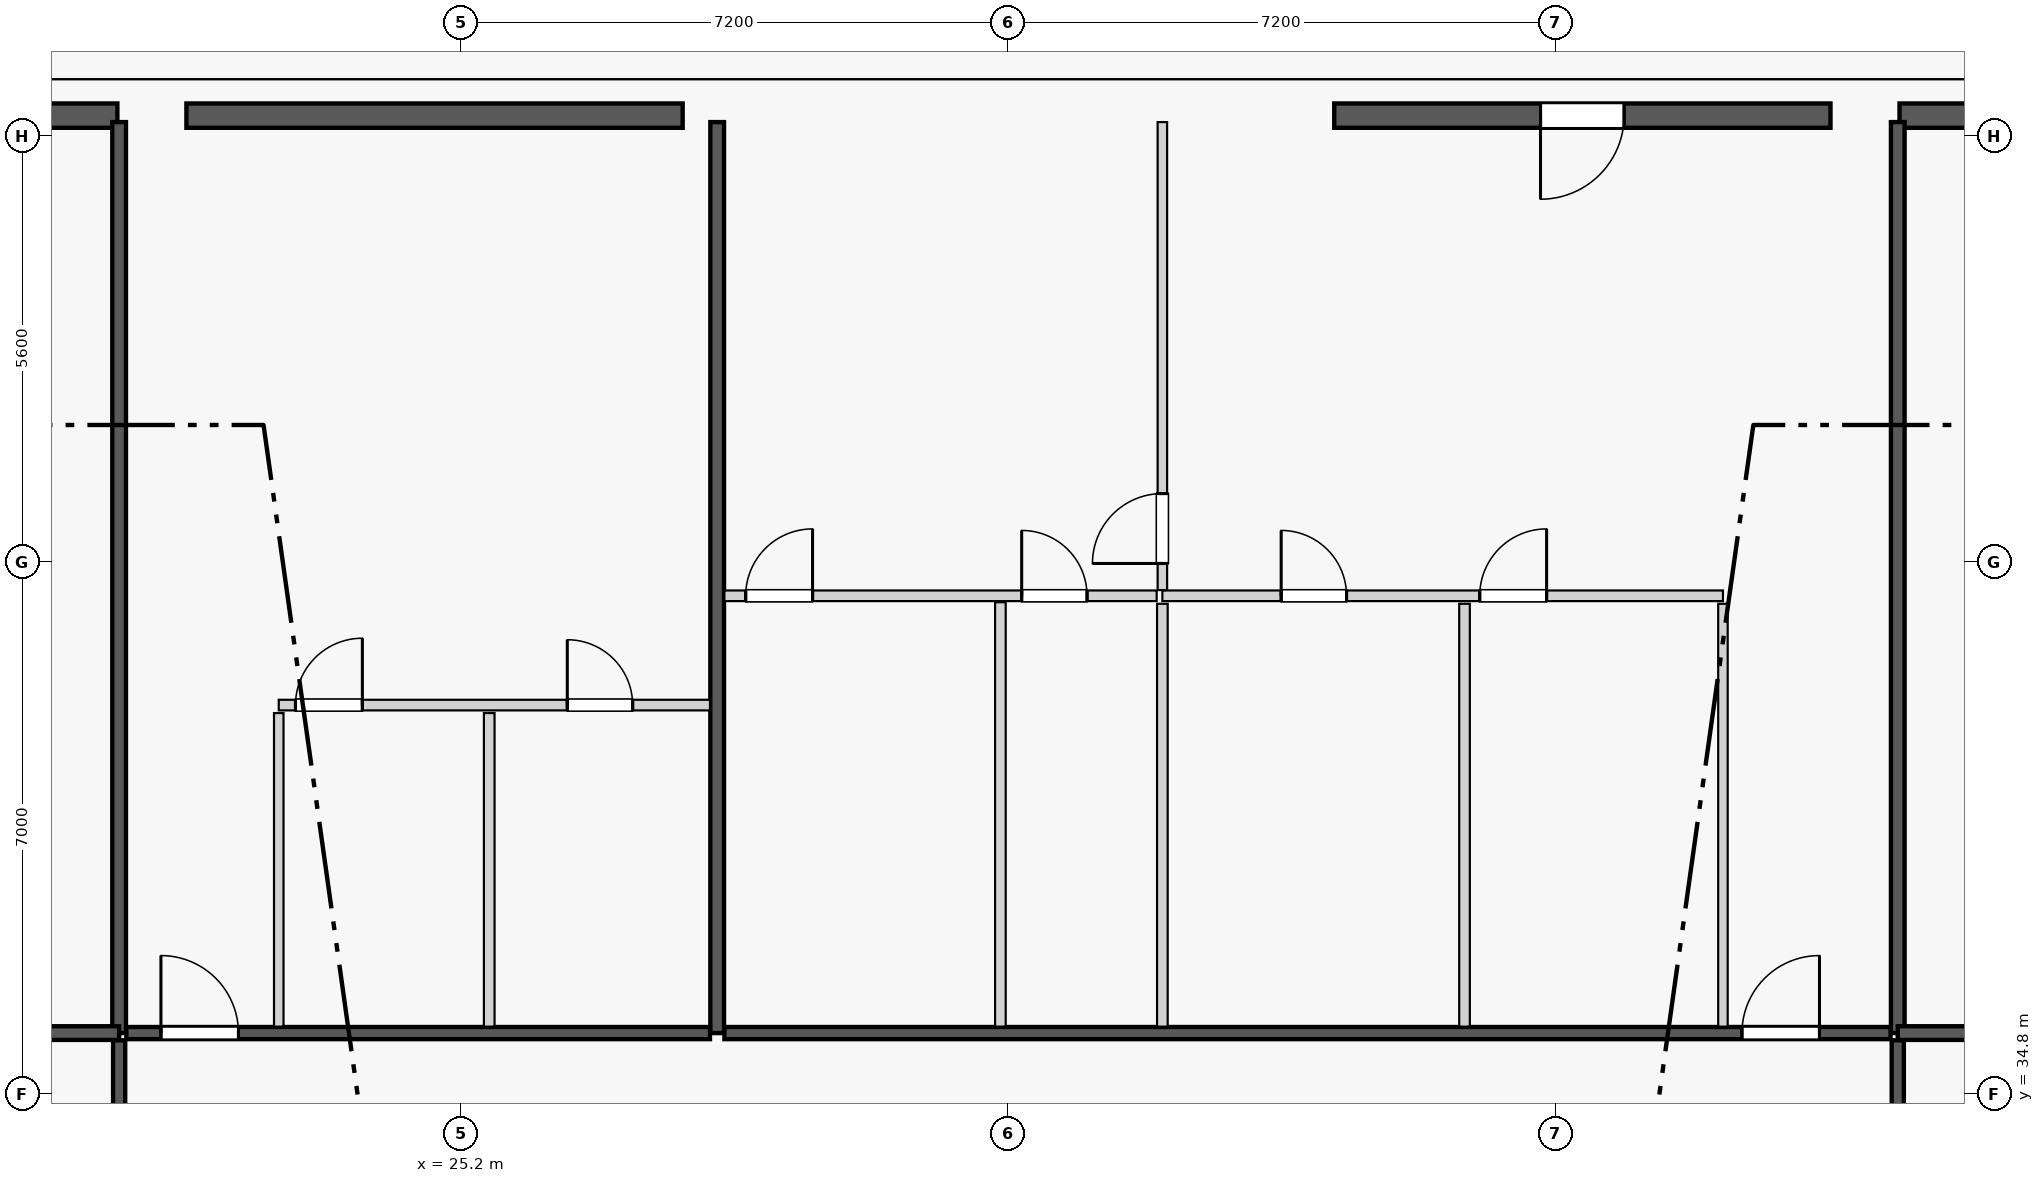
"""IFC4 building model, lengths in metres.
Left out: names, types, materials, properties, quantities, classifications, styles, units other than length and angle.
Written with IfcOpenShell. Run it as: python <this file> out.ifc"""

import sys

from ifc_helpers import new_model, si_unit, direction, frame, frame_2d, origin, origin_2d, place, context, subcontext, project, spatial, rectangle, extrude, element, fill, save


model = new_model("IFC4")
c1 = context("Model", 3, precision=1e-05, world=origin(), true_north=direction((0.0, 1.0)))
c2 = subcontext(c1, "Body", "Model", "MODEL_VIEW")
j1 = project(units=[si_unit("LENGTHUNIT", "METRE"), si_unit("PLANEANGLEUNIT", "RADIAN")], contexts=[c1])
p1 = place(None, origin())
s1 = spatial("IfcSite", under=j1, at=p1, CompositionType="ELEMENT")
p2 = place(p1, origin())
s2 = spatial("IfcBuilding", under=s1, at=p2, CompositionType="ELEMENT")
p3 = place(p2, frame((0.0, 0.0, 167.7)))
s3 = spatial("IfcBuildingStorey", under=s2, at=p3, CompositionType="ELEMENT", Elevation=167.7)
for number, where, z_axis, x_axis in (
    (1, (43.669, 47.661, 0.0), (0.0, 0.0, 1.0), (1.0, 0.0, 0.0)),
    (2, (36.232, 47.608, 0.0), (0.0, 0.0, 1.0), (1.0, 0.0, 0.0)),
    (3, (28.568, 47.608, 0.0), (0.0, 0.0, 1.0), (1.0, 0.0, 0.0)),
    (4, (21.131, 47.661, 0.0), (0.0, 0.0, 1.0), (1.0, 0.0, 0.0)),
):
    element("IfcColumn", number, at=place(p3, frame(where, z_axis=z_axis, x_axis=x_axis)), inside=s3, PredefinedType="COLUMN", context=c2, shape_type="SweptSolid", body=[
        extrude(rectangle(XDim=0.9, YDim=0.9, at=origin_2d()), origin(), (0.0, 0.0, 1.0), 4.2),
    ])
p4 = place(p3, frame((45.4, 47.67, 0.0), z_axis=(0.0, 0.0, 1.0), x_axis=(-1.0, 0.0, 0.0)))
e5 = element("IfcWall", 5, at=p4, inside=s3, PredefinedType="STANDARD", context=c2, shape_type="SweptSolid", body=[
    extrude(rectangle(XDim=1.277, YDim=0.32, at=frame_2d((0.638, 0.0))), origin(), (0.0, 0.0, 1.0), 4.0),
])
p5 = place(p3, frame((43.215, 47.67, 0.0), z_axis=(0.0, 0.0, 1.0), x_axis=(-1.0, 0.0, 0.0)))
e6 = element("IfcWall", 6, at=p5, inside=s3, PredefinedType="STANDARD", context=c2, shape_type="SweptSolid", body=[
    extrude(rectangle(XDim=6.529, YDim=0.32, at=frame_2d((3.265, 0.0))), origin(), (0.0, 0.0, 1.0), 2.59),
])
p6 = place(p5, frame((2.715, 0.0, 0.0)))
e7 = element("IfcOpeningElement", 7, at=p6, cuts=e6, PredefinedType="OPENING", context=c2, shape_type="SweptSolid", body=[
    extrude(rectangle(XDim=1.1, YDim=2.25, at=frame_2d((0.55, 1.125))), frame((0.0, 0.17, 0.0), z_axis=(0.0, -1.0, 0.0), x_axis=(1.0, 0.0, 0.0)), (0.0, 0.0, 1.0), 0.34),
])
p7 = place(p3, frame((28.114, 47.67, 0.0), z_axis=(0.0, 0.0, 1.0), x_axis=(-1.0, 0.0, 0.0)))
e8 = element("IfcWall", 8, at=p7, inside=s3, PredefinedType="STANDARD", context=c2, shape_type="SweptSolid", body=[
    extrude(rectangle(XDim=6.529, YDim=0.32, at=frame_2d((3.265, 0.0))), origin(), (0.0, 0.0, 1.0), 2.59),
])
p8 = place(p7, frame((2.715, 0.0, 0.75)))
e9 = element("IfcOpeningElement", 9, at=p8, cuts=e8, PredefinedType="OPENING", context=c2, shape_type="SweptSolid", body=[
    extrude(rectangle(XDim=1.1, YDim=1.69, at=frame_2d((0.55, 0.845))), frame((0.0, 0.17, 0.0), z_axis=(0.0, -1.0, 0.0), x_axis=(1.0, 0.0, 0.0)), (0.0, 0.0, 1.0), 0.34),
])
p9 = place(p3, frame((20.677, 47.67, 0.0), z_axis=(0.0, 0.0, 1.0), x_axis=(-1.0, 0.0, 0.0)))
e10 = element("IfcWall", 10, at=p9, inside=s3, PredefinedType="STANDARD", context=c2, shape_type="SweptSolid", body=[
    extrude(rectangle(XDim=1.277, YDim=0.32, at=frame_2d((0.639, 0.0))), origin(), (0.0, 0.0, 1.0), 4.0),
])
p10 = place(p3, frame((20.7, 35.6, 0.0), z_axis=(0.0, 0.0, 1.0), x_axis=(0.0, 1.0, 0.0)))
e11 = element("IfcWall", 11, at=p10, inside=s3, PredefinedType="PARTITIONING", context=c2, shape_type="SweptSolid", body=[
    extrude(rectangle(XDim=11.985, YDim=0.18, at=frame_2d((5.992, 0.0))), origin(), (0.0, 0.0, 1.0), 4.0),
])
p11 = place(p3, frame((28.568, 35.6, 0.0), z_axis=(0.0, 0.0, 1.0), x_axis=(0.0, 1.0, 0.0)))
e12 = element("IfcWall", 12, at=p11, inside=s3, PredefinedType="PARTITIONING", context=c2, shape_type="SweptSolid", body=[
    extrude(rectangle(XDim=11.985, YDim=0.18, at=frame_2d((5.992, 0.0))), origin(), (0.0, 0.0, 1.0), 2.59),
])
p12 = place(p3, frame((44.1, 35.6, 0.0), z_axis=(0.0, 0.0, 1.0), x_axis=(0.0, 1.0, 0.0)))
e13 = element("IfcWall", 13, at=p12, inside=s3, PredefinedType="PARTITIONING", context=c2, shape_type="SweptSolid", body=[
    extrude(rectangle(XDim=11.985, YDim=0.18, at=frame_2d((5.992, 0.0))), origin(), (0.0, 0.0, 1.0), 4.0),
])
p13 = place(p3, frame((20.795, 35.6, 0.0), z_axis=(0.0, 0.0, 1.0), x_axis=(1.0, 0.0, 0.0)))
e14 = element("IfcWall", 14, at=p13, inside=s3, PredefinedType="PARTITIONING", context=c2, shape_type="SweptSolid", body=[
    extrude(rectangle(XDim=7.678, YDim=0.16, at=frame_2d((3.839, 0.0))), origin(), (0.0, 0.0, 1.0), 4.0),
])
p14 = place(p13, frame((0.455, 0.0, 0.0)))
e15 = element("IfcOpeningElement", 15, at=p14, cuts=e14, PredefinedType="OPENING", context=c2, shape_type="SweptSolid", body=[
    extrude(rectangle(XDim=1.02, YDim=2.25, at=frame_2d((0.51, 1.125))), frame((0.0, 0.09, 0.0), z_axis=(0.0, -1.0, 0.0), x_axis=(1.0, 0.0, 0.0)), (0.0, 0.0, 1.0), 0.18),
])
p15 = place(p3, frame((22.8, 35.685, 0.0), z_axis=(0.0, 0.0, 1.0), x_axis=(0.0, 1.0, 0.0)))
e16 = element("IfcWall", 16, at=p15, inside=s3, PredefinedType="PARTITIONING", context=c2, shape_type="SweptSolid", body=[
    extrude(rectangle(XDim=4.125, YDim=0.125, at=frame_2d((2.062, 0.0))), origin(), (0.0, 0.0, 1.0), 2.59),
])
p16 = place(p3, frame((22.8, 39.915, 0.0), z_axis=(0.0, 0.0, 1.0), x_axis=(1.0, 0.0, 0.0)))
e17 = element("IfcWall", 17, at=p16, inside=s3, PredefinedType="PLUMBINGWALL", context=c2, shape_type="SweptSolid", body=[
    extrude(rectangle(XDim=5.673, YDim=0.14, at=frame_2d((2.836, 0.0))), origin(), (0.0, 0.0, 1.0), 4.0),
])
p17 = place(p16, frame((3.796, 0.0, 0.0)))
e18 = element("IfcOpeningElement", 18, at=p17, cuts=e17, PredefinedType="OPENING", context=c2, shape_type="SweptSolid", body=[
    extrude(rectangle(XDim=0.86, YDim=2.1, at=frame_2d((0.43, 1.05))), frame((0.0, 0.08, 0.0), z_axis=(0.0, -1.0, 0.0), x_axis=(1.0, 0.0, 0.0)), (0.0, 0.0, 1.0), 0.16),
])
p18 = place(p16, frame((0.22, 0.0, 0.0)))
e19 = element("IfcOpeningElement", 19, at=p18, cuts=e17, PredefinedType="OPENING", context=c2, shape_type="SweptSolid", body=[
    extrude(rectangle(XDim=0.88, YDim=2.15, at=frame_2d((0.44, 1.075))), frame((0.0, 0.08, 0.0), z_axis=(0.0, -1.0, 0.0), x_axis=(1.0, 0.0, 0.0)), (0.0, 0.0, 1.0), 0.16),
])
p19 = place(p3, frame((25.569, 35.685, 0.0), z_axis=(0.0, 0.0, 1.0), x_axis=(0.0, 1.0, 0.0)))
e20 = element("IfcWall", 20, at=p19, inside=s3, PredefinedType="PLUMBINGWALL", context=c2, shape_type="SweptSolid", body=[
    extrude(rectangle(XDim=4.125, YDim=0.14, at=frame_2d((2.062, 0.0))), origin(), (0.0, 0.0, 1.0), 4.0),
])
p20 = place(p3, frame((28.663, 35.6, 0.0), z_axis=(0.0, 0.0, 1.0), x_axis=(1.0, 0.0, 0.0)))
e21 = element("IfcWall", 21, at=p20, inside=s3, PredefinedType="PARTITIONING", context=c2, shape_type="SweptSolid", body=[
    extrude(rectangle(XDim=15.342, YDim=0.16, at=frame_2d((7.671, 0.0))), origin(), (0.0, 0.0, 1.0), 4.0),
])
p21 = place(p20, frame((13.387, 0.0, 0.0)))
e22 = element("IfcOpeningElement", 22, at=p21, cuts=e21, PredefinedType="OPENING", context=c2, shape_type="SweptSolid", body=[
    extrude(rectangle(XDim=1.02, YDim=2.25, at=frame_2d((0.51, 1.125))), frame((0.0, 0.09, 0.0), z_axis=(0.0, -1.0, 0.0), x_axis=(1.0, 0.0, 0.0)), (0.0, 0.0, 1.0), 0.18),
])
p22 = place(p3, frame((41.8, 35.685, 0.0), z_axis=(0.0, 0.0, 1.0), x_axis=(0.0, 1.0, 0.0)))
e23 = element("IfcWall", 23, at=p22, inside=s3, PredefinedType="PARTITIONING", context=c2, shape_type="SweptSolid", body=[
    extrude(rectangle(XDim=5.563, YDim=0.125, at=frame_2d((2.781, 0.0))), origin(), (0.0, 0.0, 1.0), 2.59),
])
p23 = place(p3, frame((34.425, 41.353, 0.0), z_axis=(0.0, 0.0, 1.0), x_axis=(1.0, 0.0, 0.0)))
e24 = element("IfcWall", 24, at=p23, inside=s3, PredefinedType="PLUMBINGWALL", context=c2, shape_type="SweptSolid", body=[
    extrude(rectangle(XDim=7.375, YDim=0.14, at=frame_2d((3.688, 0.0))), origin(), (0.0, 0.0, 1.0), 3.635),
])
p24 = place(p23, frame((1.563, 0.0, 0.0)))
e25 = element("IfcOpeningElement", 25, at=p24, cuts=e24, PredefinedType="OPENING", context=c2, shape_type="SweptSolid", body=[
    extrude(rectangle(XDim=0.86, YDim=2.1, at=frame_2d((0.43, 1.05))), frame((0.0, 0.08, 0.0), z_axis=(0.0, -1.0, 0.0), x_axis=(1.0, 0.0, 0.0)), (0.0, 0.0, 1.0), 0.16),
])
p25 = place(p23, frame((4.175, 0.0, 0.0)))
e26 = element("IfcOpeningElement", 26, at=p25, cuts=e24, PredefinedType="OPENING", context=c2, shape_type="SweptSolid", body=[
    extrude(rectangle(XDim=0.88, YDim=2.15, at=frame_2d((0.44, 1.075))), frame((0.0, 0.08, 0.0), z_axis=(0.0, -1.0, 0.0), x_axis=(1.0, 0.0, 0.0)), (0.0, 0.0, 1.0), 0.16),
])
p26 = place(p3, frame((28.663, 41.353, 0.0), z_axis=(0.0, 0.0, 1.0), x_axis=(1.0, 0.0, 0.0)))
e27 = element("IfcWall", 27, at=p26, inside=s3, PredefinedType="PLUMBINGWALL", context=c2, shape_type="SweptSolid", body=[
    extrude(rectangle(XDim=5.687, YDim=0.14, at=frame_2d((2.844, 0.0))), origin(), (0.0, 0.0, 1.0), 3.635),
])
p27 = place(p26, frame((0.28, 0.0, 0.0)))
e28 = element("IfcOpeningElement", 28, at=p27, cuts=e27, PredefinedType="OPENING", context=c2, shape_type="SweptSolid", body=[
    extrude(rectangle(XDim=0.88, YDim=2.15, at=frame_2d((0.44, 1.075))), frame((0.0, 0.08, 0.0), z_axis=(0.0, -1.0, 0.0), x_axis=(1.0, 0.0, 0.0)), (0.0, 0.0, 1.0), 0.16),
])
p28 = place(p26, frame((3.911, 0.0, 0.0)))
e29 = element("IfcOpeningElement", 29, at=p28, cuts=e27, PredefinedType="OPENING", context=c2, shape_type="SweptSolid", body=[
    extrude(rectangle(XDim=0.86, YDim=2.1, at=frame_2d((0.43, 1.05))), frame((0.0, 0.08, 0.0), z_axis=(0.0, -1.0, 0.0), x_axis=(1.0, 0.0, 0.0)), (0.0, 0.0, 1.0), 0.16),
])
for number, where, z_axis, x_axis in (
    (30, (38.4, 35.685, 0.0), (0.0, 0.0, 1.0), (0.0, 1.0, 0.0)),
    (31, (34.425, 35.685, 0.0), (0.0, 0.0, 1.0), (0.0, 1.0, 0.0)),
):
    element("IfcWall", number, at=place(p3, frame(where, z_axis=z_axis, x_axis=x_axis)), inside=s3, PredefinedType="PLUMBINGWALL", context=c2, shape_type="SweptSolid", body=[
        extrude(rectangle(XDim=5.563, YDim=0.14, at=frame_2d((2.781, 0.0))), origin(), (0.0, 0.0, 1.0), 4.0),
    ])
p29 = place(p3, frame((34.425, 41.428, 0.0), z_axis=(0.0, 0.0, 1.0), x_axis=(0.0, 1.0, 0.0)))
e32 = element("IfcWall", 32, at=p29, inside=s3, PredefinedType="PARTITIONING", context=c2, shape_type="SweptSolid", body=[
    extrude(rectangle(XDim=6.157, YDim=0.125, at=frame_2d((3.079, 0.0))), origin(), (0.0, 0.0, 1.0), 4.0),
])
p30 = place(p29, frame((0.35, 0.0, 0.0)))
e33 = element("IfcOpeningElement", 33, at=p30, cuts=e32, PredefinedType="OPENING", context=c2, shape_type="SweptSolid", body=[
    extrude(rectangle(XDim=0.92, YDim=2.15, at=frame_2d((0.46, 1.075))), frame((0.0, 0.073, 0.0), z_axis=(0.0, -1.0, 0.0), x_axis=(1.0, 0.0, 0.0)), (0.0, 0.0, 1.0), 0.145),
])
p31 = place(p3, frame((32.294, 35.685, 0.0), z_axis=(0.0, 0.0, 1.0), x_axis=(0.0, 1.0, 0.0)))
e34 = element("IfcWall", 34, at=p31, inside=s3, PredefinedType="PLUMBINGWALL", context=c2, shape_type="SweptSolid", body=[
    extrude(rectangle(XDim=5.583, YDim=0.14, at=frame_2d((2.792, 0.0))), origin(), (0.0, 0.0, 1.0), 4.0),
])
for number, where, z_axis, x_axis in (
    (35, (12.427, 35.6, 0.0), (0.0, 0.0, 1.0), (1.0, 0.0, 0.0)),
    (36, (44.1, 35.6, 0.0), (0.0, 0.0, 1.0), (1.0, 0.0, 0.0)),
):
    element("IfcWall", number, at=place(p3, frame(where, z_axis=z_axis, x_axis=x_axis)), inside=s3, PredefinedType="PARTITIONING", context=c2, shape_type="SweptSolid", body=[
        extrude(rectangle(XDim=8.273, YDim=0.18, at=frame_2d((4.136, 0.0))), origin(), (0.0, 0.0, 1.0), 4.0),
    ])
p32 = place(p3, frame((20.7, 16.445, 0.0), z_axis=(0.0, 0.0, 1.0), x_axis=(0.0, 1.0, 0.0)))
e37 = element("IfcWall", 37, at=p32, inside=s3, PredefinedType="PARTITIONING", context=c2, shape_type="SweptSolid", body=[
    extrude(rectangle(XDim=19.06, YDim=0.16, at=frame_2d((9.53, 0.0))), origin(), (0.0, 0.0, 1.0), 4.0),
])
p33 = place(p32, frame((0.4, 0.0, 0.0)))
e38 = element("IfcOpeningElement", 38, at=p33, cuts=e37, PredefinedType="OPENING", context=c2, shape_type="SweptSolid", body=[
    extrude(rectangle(XDim=1.02, YDim=2.25, at=frame_2d((0.51, 1.125))), frame((0.0, 0.09, 0.0), z_axis=(0.0, -1.0, 0.0), x_axis=(1.0, 0.0, 0.0)), (0.0, 0.0, 1.0), 0.18),
])
p34 = place(p3, frame((44.1, 16.445, 0.0), z_axis=(0.0, 0.0, 1.0), x_axis=(0.0, 1.0, 0.0)))
e39 = element("IfcWall", 39, at=p34, inside=s3, PredefinedType="PARTITIONING", context=c2, shape_type="SweptSolid", body=[
    extrude(rectangle(XDim=19.06, YDim=0.16, at=frame_2d((9.53, 0.0))), origin(), (0.0, 0.0, 1.0), 4.0),
])
p35 = place(p34, frame((0.45, 0.0, 0.0)))
e40 = element("IfcOpeningElement", 40, at=p35, cuts=e39, PredefinedType="OPENING", context=c2, shape_type="SweptSolid", body=[
    extrude(rectangle(XDim=1.02, YDim=2.25, at=frame_2d((0.51, 1.125))), frame((0.0, 0.09, 0.0), z_axis=(0.0, -1.0, 0.0), x_axis=(1.0, 0.0, 0.0)), (0.0, 0.0, 1.0), 0.18),
])
p36 = place(p6, origin())
e41 = element("IfcDoor", 41, at=p36, inside=s3, OperationType="SINGLE_SWING_RIGHT", PredefinedType="DOOR", context=c2, shape_type="SweptSolid", body=[
    extrude(rectangle(XDim=1.1, YDim=2.25, at=frame_2d((0.55, 1.125))), frame((0.0, 0.025, 0.0), z_axis=(0.0, -1.0, 0.0), x_axis=(1.0, 0.0, 0.0)), (0.0, 0.0, 1.0), 0.05),
])
fill(e7, e41)
p37 = place(p8, origin())
e42 = element("IfcWindow", 42, at=p37, inside=s3, PartitioningType="SINGLE_PANEL", PredefinedType="WINDOW", context=c2, shape_type="SweptSolid", body=[
    extrude(rectangle(XDim=1.1, YDim=1.69, at=frame_2d((0.55, 0.845))), frame((0.0, 0.03, 0.0), z_axis=(0.0, -1.0, 0.0), x_axis=(1.0, 0.0, 0.0)), (0.0, 0.0, 1.0), 0.06),
])
fill(e9, e42)
p38 = place(p17, origin())
e43 = element("IfcDoor", 43, at=p38, inside=s3, OperationType="SINGLE_SWING_LEFT", PredefinedType="DOOR", context=c2, shape_type="SweptSolid", body=[
    extrude(rectangle(XDim=0.86, YDim=2.1, at=frame_2d((0.43, 1.05))), frame((0.0, 0.025, 0.0), z_axis=(0.0, -1.0, 0.0), x_axis=(1.0, 0.0, 0.0)), (0.0, 0.0, 1.0), 0.05),
])
fill(e18, e43)
p39 = place(p14, origin())
e44 = element("IfcDoor", 44, at=p39, inside=s3, OperationType="SINGLE_SWING_LEFT", PredefinedType="DOOR", context=c2, shape_type="SweptSolid", body=[
    extrude(rectangle(XDim=1.02, YDim=2.25, at=frame_2d((0.51, 1.125))), frame((0.0, 0.025, 0.0), z_axis=(0.0, -1.0, 0.0), x_axis=(1.0, 0.0, 0.0)), (0.0, 0.0, 1.0), 0.05),
])
fill(e15, e44)
p40 = place(p18, origin())
e45 = element("IfcDoor", 45, at=p40, inside=s3, OperationType="SINGLE_SWING_RIGHT", PredefinedType="DOOR", context=c2, shape_type="SweptSolid", body=[
    extrude(rectangle(XDim=0.88, YDim=2.15, at=frame_2d((0.44, 1.075))), frame((0.0, 0.025, 0.0), z_axis=(0.0, -1.0, 0.0), x_axis=(1.0, 0.0, 0.0)), (0.0, 0.0, 1.0), 0.05),
])
fill(e19, e45)
p41 = place(p24, origin())
e46 = element("IfcDoor", 46, at=p41, inside=s3, OperationType="SINGLE_SWING_LEFT", PredefinedType="DOOR", context=c2, shape_type="SweptSolid", body=[
    extrude(rectangle(XDim=0.86, YDim=2.1, at=frame_2d((0.43, 1.05))), frame((0.0, 0.025, 0.0), z_axis=(0.0, -1.0, 0.0), x_axis=(1.0, 0.0, 0.0)), (0.0, 0.0, 1.0), 0.05),
])
fill(e25, e46)
p42 = place(p27, origin())
e47 = element("IfcDoor", 47, at=p42, inside=s3, OperationType="SINGLE_SWING_RIGHT", PredefinedType="DOOR", context=c2, shape_type="SweptSolid", body=[
    extrude(rectangle(XDim=0.88, YDim=2.15, at=frame_2d((0.44, 1.075))), frame((0.0, 0.025, 0.0), z_axis=(0.0, -1.0, 0.0), x_axis=(1.0, 0.0, 0.0)), (0.0, 0.0, 1.0), 0.05),
])
fill(e28, e47)
p43 = place(p28, origin())
e48 = element("IfcDoor", 48, at=p43, inside=s3, OperationType="SINGLE_SWING_LEFT", PredefinedType="DOOR", context=c2, shape_type="SweptSolid", body=[
    extrude(rectangle(XDim=0.86, YDim=2.1, at=frame_2d((0.43, 1.05))), frame((0.0, 0.025, 0.0), z_axis=(0.0, -1.0, 0.0), x_axis=(1.0, 0.0, 0.0)), (0.0, 0.0, 1.0), 0.05),
])
fill(e29, e48)
p44 = place(p21, origin())
e49 = element("IfcDoor", 49, at=p44, inside=s3, OperationType="SINGLE_SWING_RIGHT", PredefinedType="DOOR", context=c2, shape_type="SweptSolid", body=[
    extrude(rectangle(XDim=1.02, YDim=2.25, at=frame_2d((0.51, 1.125))), frame((0.0, 0.025, 0.0), z_axis=(0.0, -1.0, 0.0), x_axis=(1.0, 0.0, 0.0)), (0.0, 0.0, 1.0), 0.05),
])
fill(e22, e49)
p45 = place(p25, origin())
e50 = element("IfcDoor", 50, at=p45, inside=s3, OperationType="SINGLE_SWING_RIGHT", PredefinedType="DOOR", context=c2, shape_type="SweptSolid", body=[
    extrude(rectangle(XDim=0.88, YDim=2.15, at=frame_2d((0.44, 1.075))), frame((0.0, 0.025, 0.0), z_axis=(0.0, -1.0, 0.0), x_axis=(1.0, 0.0, 0.0)), (0.0, 0.0, 1.0), 0.05),
])
fill(e26, e50)
p46 = place(p30, origin())
e51 = element("IfcDoor", 51, at=p46, inside=s3, OperationType="SINGLE_SWING_LEFT", PredefinedType="DOOR", context=c2, shape_type="SweptSolid", body=[
    extrude(rectangle(XDim=0.92, YDim=2.15, at=frame_2d((0.46, 1.075))), frame((0.0, 0.025, 0.0), z_axis=(0.0, -1.0, 0.0), x_axis=(1.0, 0.0, 0.0)), (0.0, 0.0, 1.0), 0.05),
])
fill(e33, e51)
save(model, sys.argv[1])
